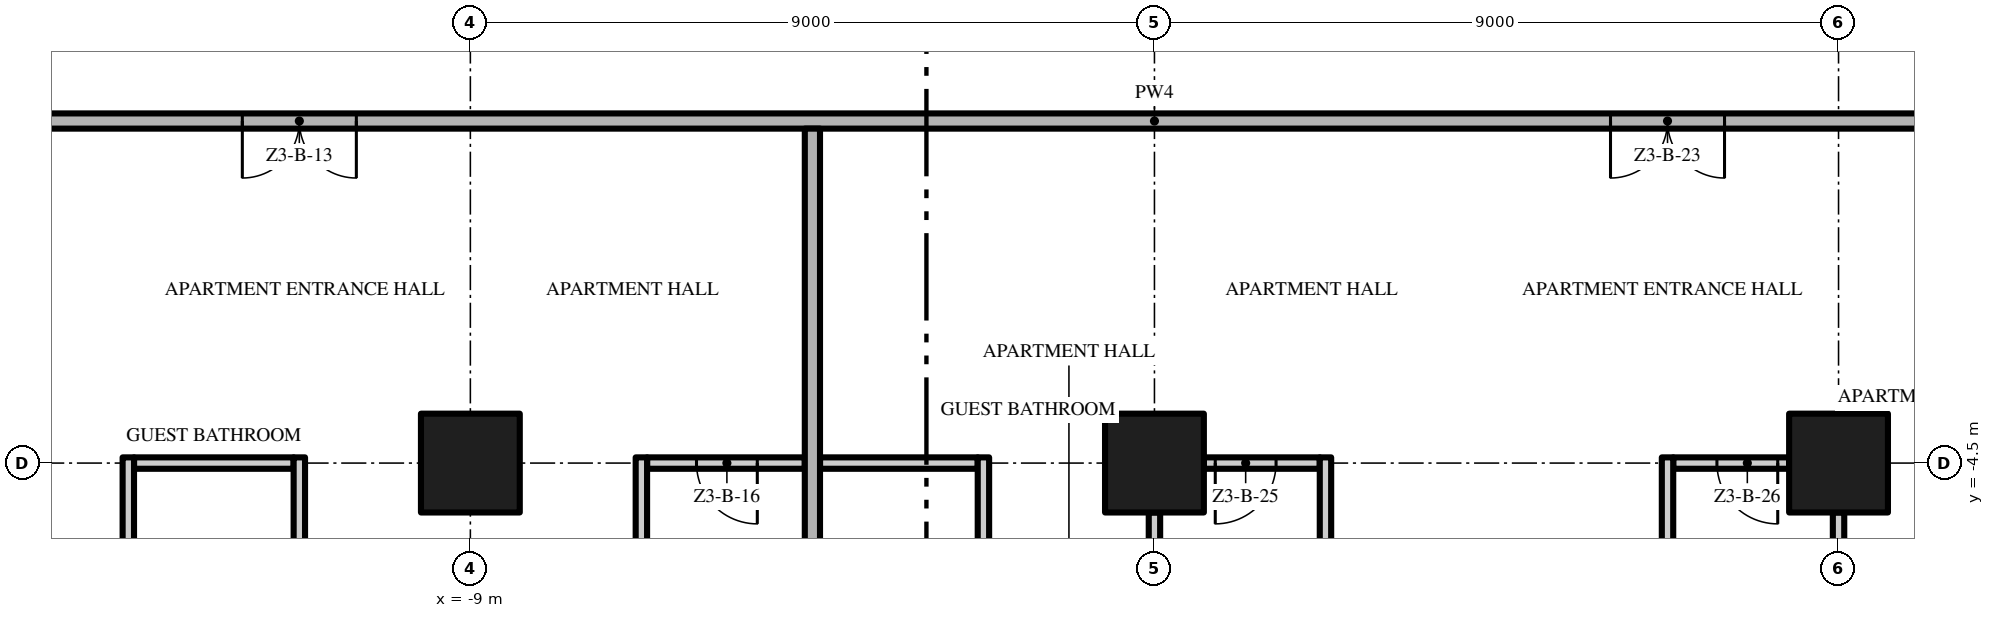
"""IFC4 building model, lengths in metres.
Left out: names, types, materials, properties, quantities, classifications, styles, units other than length and angle.
Written with IfcOpenShell. Run it as: python <this file> out.ifc"""

import sys

from ifc_helpers import new_model, si_unit, direction, frame, frame_2d, origin, origin_2d, place, context, subcontext, project, spatial, rectangle, extrude, element, fill, save


model = new_model("IFC4")
c1 = context("Model", 3, precision=1e-05, world=origin(), true_north=direction((0.0, 1.0)))
c2 = subcontext(c1, "Body", "Model", "MODEL_VIEW")
j1 = project(units=[si_unit("LENGTHUNIT", "METRE"), si_unit("PLANEANGLEUNIT", "RADIAN")], contexts=[c1])
p1 = place(None, origin())
s1 = spatial("IfcSite", under=j1, at=p1, CompositionType="ELEMENT")
p2 = place(p1, origin())
s2 = spatial("IfcBuilding", under=s1, at=p2, CompositionType="ELEMENT")
p3 = place(p2, frame((0.0, 0.0, 136.4)))
s3 = spatial("IfcBuildingStorey", under=s2, at=p3, CompositionType="ELEMENT", Elevation=136.4)
for number, where, z_axis, x_axis in (
    (1, (-9.0, -4.5, 0.0), (0.0, 0.0, 1.0), (1.0, 0.0, 0.0)),
    (2, (0.0, -4.5, 0.0), (0.0, 0.0, 1.0), (1.0, 0.0, 0.0)),
    (3, (9.0, -4.5, 0.0), (0.0, 0.0, 1.0), (1.0, 0.0, 0.0)),
):
    element("IfcColumn", number, at=place(p3, frame(where, z_axis=z_axis, x_axis=x_axis)), inside=s3, PredefinedType="COLUMN", context=c2, shape_type="SweptSolid", body=[
        extrude(rectangle(XDim=1.3, YDim=1.3, at=origin_2d()), origin(), (0.0, 0.0, 1.0), 3.5),
    ])
p4 = place(p3, frame((-13.425, -4.5, 0.0), z_axis=(0.0, 0.0, 1.0), x_axis=(1.0, 0.0, 0.0)))
e4 = element("IfcWall", 4, at=p4, inside=s3, PredefinedType="PARTITIONING", context=c2, shape_type="SweptSolid", body=[
    extrude(rectangle(XDim=2.1, YDim=0.15, at=frame_2d((1.05, 0.0))), origin(), (0.0, 0.0, 1.0), 3.5),
])
p5 = place(p3, frame((-4.6, -4.5, 0.0), z_axis=(0.0, 0.0, 1.0), x_axis=(-1.0, 0.0, 0.0)))
e5 = element("IfcWall", 5, at=p5, inside=s3, PredefinedType="PARTITIONING", context=c2, shape_type="SweptSolid", body=[
    extrude(rectangle(XDim=2.075, YDim=0.15, at=frame_2d((1.038, 0.0))), origin(), (0.0, 0.0, 1.0), 3.5),
])
p6 = place(p5, frame((0.625, 0.0, 0.0)))
e6 = element("IfcOpeningElement", 6, at=p6, cuts=e5, PredefinedType="OPENING", context=c2, shape_type="SweptSolid", body=[
    extrude(rectangle(XDim=0.8, YDim=2.0, at=frame_2d((0.4, 1.0))), frame((0.0, 0.085, 0.0), z_axis=(0.0, -1.0, 0.0), x_axis=(1.0, 0.0, 0.0)), (0.0, 0.0, 1.0), 0.17),
])
p7 = place(p3, frame((-4.4, -4.5, 0.0), z_axis=(0.0, 0.0, 1.0), x_axis=(1.0, 0.0, 0.0)))
e7 = element("IfcWall", 7, at=p7, inside=s3, PredefinedType="PARTITIONING", context=c2, shape_type="SweptSolid", body=[
    extrude(rectangle(XDim=2.075, YDim=0.15, at=frame_2d((1.038, 0.0))), origin(), (0.0, 0.0, 1.0), 3.5),
])
p8 = place(p3, frame((2.175, -4.5, 0.0), z_axis=(0.0, 0.0, 1.0), x_axis=(-1.0, 0.0, 0.0)))
e8 = element("IfcWall", 8, at=p8, inside=s3, PredefinedType="PARTITIONING", context=c2, shape_type="SweptSolid", body=[
    extrude(rectangle(XDim=1.525, YDim=0.15, at=frame_2d((0.762, 0.0))), origin(), (0.0, 0.0, 1.0), 3.5),
])
p9 = place(p8, frame((0.575, 0.0, 0.0)))
e9 = element("IfcOpeningElement", 9, at=p9, cuts=e8, PredefinedType="OPENING", context=c2, shape_type="SweptSolid", body=[
    extrude(rectangle(XDim=0.8, YDim=2.0, at=frame_2d((0.4, 1.0))), frame((0.0, 0.085, 0.0), z_axis=(0.0, -1.0, 0.0), x_axis=(1.0, 0.0, 0.0)), (0.0, 0.0, 1.0), 0.17),
])
p10 = place(p3, frame((8.35, -4.5, 0.0), z_axis=(0.0, 0.0, 1.0), x_axis=(-1.0, 0.0, 0.0)))
e10 = element("IfcWall", 10, at=p10, inside=s3, PredefinedType="PARTITIONING", context=c2, shape_type="SweptSolid", body=[
    extrude(rectangle(XDim=1.525, YDim=0.15, at=frame_2d((0.762, 0.0))), origin(), (0.0, 0.0, 1.0), 3.5),
])
p11 = place(p10, frame((0.15, 0.0, 0.0)))
e11 = element("IfcOpeningElement", 11, at=p11, cuts=e10, PredefinedType="OPENING", context=c2, shape_type="SweptSolid", body=[
    extrude(rectangle(XDim=0.8, YDim=2.0, at=frame_2d((0.4, 1.0))), frame((0.0, 0.085, 0.0), z_axis=(0.0, -1.0, 0.0), x_axis=(1.0, 0.0, 0.0)), (0.0, 0.0, 1.0), 0.17),
])
p12 = place(p3, frame((17.5, 0.0, 0.0), z_axis=(0.0, 0.0, 1.0), x_axis=(-1.0, 0.0, 0.0)))
e12 = element("IfcWall", 12, at=p12, inside=s3, PredefinedType="PARTITIONING", context=c2, shape_type="SweptSolid", body=[
    extrude(rectangle(XDim=35.0, YDim=0.2, at=frame_2d((17.5, 0.0))), origin(), (0.0, 0.0, 1.0), 3.5),
])
p13 = place(p12, frame((28.0, 0.0, 0.0)))
e13 = element("IfcOpeningElement", 13, at=p13, cuts=e12, PredefinedType="OPENING", context=c2, shape_type="SweptSolid", body=[
    extrude(rectangle(XDim=1.5, YDim=2.4, at=frame_2d((0.75, 1.2))), frame((0.0, 0.11, 0.0), z_axis=(0.0, -1.0, 0.0), x_axis=(1.0, 0.0, 0.0)), (0.0, 0.0, 1.0), 0.22),
])
p14 = place(p12, frame((10.0, 0.0, 0.0)))
e14 = element("IfcOpeningElement", 14, at=p14, cuts=e12, PredefinedType="OPENING", context=c2, shape_type="SweptSolid", body=[
    extrude(rectangle(XDim=1.5, YDim=2.4, at=frame_2d((0.75, 1.2))), frame((0.0, 0.11, 0.0), z_axis=(0.0, -1.0, 0.0), x_axis=(1.0, 0.0, 0.0)), (0.0, 0.0, 1.0), 0.22),
])
p15 = place(p3, frame((-13.5, -4.425, 0.0), z_axis=(0.0, 0.0, 1.0), x_axis=(0.0, -1.0, 0.0)))
e15 = element("IfcWall", 15, at=p15, inside=s3, PredefinedType="PARTITIONING", context=c2, shape_type="SweptSolid", body=[
    extrude(rectangle(XDim=13.275, YDim=0.15, at=frame_2d((6.638, 0.0))), origin(), (0.0, 0.0, 1.0), 3.5),
])
p16 = place(p15, frame((1.875, 0.0, 0.0)))
e16 = element("IfcOpeningElement", 16, at=p16, cuts=e15, PredefinedType="OPENING", context=c2, shape_type="SweptSolid", body=[
    extrude(rectangle(XDim=0.9, YDim=2.1, at=frame_2d((0.45, 1.05))), frame((0.0, 0.085, 0.0), z_axis=(0.0, -1.0, 0.0), x_axis=(1.0, 0.0, 0.0)), (0.0, 0.0, 1.0), 0.17),
])
for number, where, z_axis, x_axis in (
    (17, (-11.25, -12.075, 0.0), (0.0, 0.0, 1.0), (0.0, 1.0, 0.0)),
    (18, (-6.75, -12.075, 0.0), (0.0, 0.0, 1.0), (0.0, 1.0, 0.0)),
):
    element("IfcWall", number, at=place(p3, frame(where, z_axis=z_axis, x_axis=x_axis)), inside=s3, PredefinedType="PARTITIONING", context=c2, shape_type="SweptSolid", body=[
        extrude(rectangle(XDim=7.65, YDim=0.15, at=frame_2d((3.825, 0.0))), origin(), (0.0, 0.0, 1.0), 3.5),
    ])
p17 = place(p3, frame((-4.5, -17.7, 0.0), z_axis=(0.0, 0.0, 1.0), x_axis=(0.0, 1.0, 0.0)))
e19 = element("IfcWall", 19, at=p17, inside=s3, PredefinedType="PARTITIONING", context=c2, shape_type="SweptSolid", body=[
    extrude(rectangle(XDim=17.6, YDim=0.2, at=frame_2d((8.8, 0.0))), origin(), (0.0, 0.0, 1.0), 3.5),
])
p18 = place(p3, frame((-2.25, -12.075, 0.0), z_axis=(0.0, 0.0, 1.0), x_axis=(0.0, 1.0, 0.0)))
e20 = element("IfcWall", 20, at=p18, inside=s3, PredefinedType="PARTITIONING", context=c2, shape_type="SweptSolid", body=[
    extrude(rectangle(XDim=7.65, YDim=0.15, at=frame_2d((3.825, 0.0))), origin(), (0.0, 0.0, 1.0), 3.5),
])
p19 = place(p18, frame((4.875, 0.0, 0.0)))
e21 = element("IfcOpeningElement", 21, at=p19, cuts=e20, PredefinedType="OPENING", context=c2, shape_type="SweptSolid", body=[
    extrude(rectangle(XDim=0.9, YDim=2.1, at=frame_2d((0.45, 1.05))), frame((0.0, 0.085, 0.0), z_axis=(0.0, -1.0, 0.0), x_axis=(1.0, 0.0, 0.0)), (0.0, 0.0, 1.0), 0.17),
])
p20 = place(p18, frame((1.125, 0.0, 0.0)))
e22 = element("IfcOpeningElement", 22, at=p20, cuts=e20, PredefinedType="OPENING", context=c2, shape_type="SweptSolid", body=[
    extrude(rectangle(XDim=0.9, YDim=2.1, at=frame_2d((0.45, 1.05))), frame((0.0, 0.085, 0.0), z_axis=(0.0, -1.0, 0.0), x_axis=(1.0, 0.0, 0.0)), (0.0, 0.0, 1.0), 0.17),
])
p21 = place(p3, frame((0.0, -12.85, 0.0), z_axis=(0.0, 0.0, 1.0), x_axis=(0.0, 1.0, 0.0)))
e23 = element("IfcWall", 23, at=p21, inside=s3, PredefinedType="PARTITIONING", context=c2, shape_type="SweptSolid", body=[
    extrude(rectangle(XDim=7.7, YDim=0.15, at=frame_2d((3.85, 0.0))), origin(), (0.0, 0.0, 1.0), 3.5),
])
for number, where, z_axis, x_axis in (
    (24, (2.25, -12.075, 0.0), (0.0, 0.0, 1.0), (0.0, 1.0, 0.0)),
    (25, (6.75, -12.075, 0.0), (0.0, 0.0, 1.0), (0.0, 1.0, 0.0)),
):
    element("IfcWall", number, at=place(p3, frame(where, z_axis=z_axis, x_axis=x_axis)), inside=s3, PredefinedType="PARTITIONING", context=c2, shape_type="SweptSolid", body=[
        extrude(rectangle(XDim=7.65, YDim=0.15, at=frame_2d((3.825, 0.0))), origin(), (0.0, 0.0, 1.0), 3.5),
    ])
p22 = place(p3, frame((9.0, -12.85, 0.0), z_axis=(0.0, 0.0, 1.0), x_axis=(0.0, 1.0, 0.0)))
e26 = element("IfcWall", 26, at=p22, inside=s3, PredefinedType="PARTITIONING", context=c2, shape_type="SweptSolid", body=[
    extrude(rectangle(XDim=7.7, YDim=0.15, at=frame_2d((3.85, 0.0))), origin(), (0.0, 0.0, 1.0), 3.5),
])
p23 = place(p13, origin())
e27 = element("IfcDoor", 27, at=p23, inside=s3, OperationType="DOUBLE_DOOR_SINGLE_SWING", PredefinedType="DOOR", context=c2, shape_type="SweptSolid", body=[
    extrude(rectangle(XDim=1.5, YDim=2.4, at=frame_2d((0.75, 1.2))), frame((0.0, 0.025, 0.0), z_axis=(0.0, -1.0, 0.0), x_axis=(1.0, 0.0, 0.0)), (0.0, 0.0, 1.0), 0.05),
])
fill(e13, e27)
p24 = place(p6, origin())
e28 = element("IfcDoor", 28, at=p24, inside=s3, OperationType="SINGLE_SWING_LEFT", PredefinedType="DOOR", context=c2, shape_type="SweptSolid", body=[
    extrude(rectangle(XDim=0.8, YDim=2.0, at=frame_2d((0.4, 1.0))), frame((0.0, 0.025, 0.0), z_axis=(0.0, -1.0, 0.0), x_axis=(1.0, 0.0, 0.0)), (0.0, 0.0, 1.0), 0.05),
])
fill(e6, e28)
p25 = place(p14, origin())
e29 = element("IfcDoor", 29, at=p25, inside=s3, OperationType="DOUBLE_DOOR_SINGLE_SWING", PredefinedType="DOOR", context=c2, shape_type="SweptSolid", body=[
    extrude(rectangle(XDim=1.5, YDim=2.4, at=frame_2d((0.75, 1.2))), frame((0.0, 0.025, 0.0), z_axis=(0.0, -1.0, 0.0), x_axis=(1.0, 0.0, 0.0)), (0.0, 0.0, 1.0), 0.05),
])
fill(e14, e29)
p26 = place(p9, origin())
e30 = element("IfcDoor", 30, at=p26, inside=s3, OperationType="SINGLE_SWING_RIGHT", PredefinedType="DOOR", context=c2, shape_type="SweptSolid", body=[
    extrude(rectangle(XDim=0.8, YDim=2.0, at=frame_2d((0.4, 1.0))), frame((0.0, 0.025, 0.0), z_axis=(0.0, -1.0, 0.0), x_axis=(1.0, 0.0, 0.0)), (0.0, 0.0, 1.0), 0.05),
])
fill(e9, e30)
p27 = place(p11, origin())
e31 = element("IfcDoor", 31, at=p27, inside=s3, OperationType="SINGLE_SWING_LEFT", PredefinedType="DOOR", context=c2, shape_type="SweptSolid", body=[
    extrude(rectangle(XDim=0.8, YDim=2.0, at=frame_2d((0.4, 1.0))), frame((0.0, 0.025, 0.0), z_axis=(0.0, -1.0, 0.0), x_axis=(1.0, 0.0, 0.0)), (0.0, 0.0, 1.0), 0.05),
])
fill(e11, e31)
save(model, sys.argv[1])
